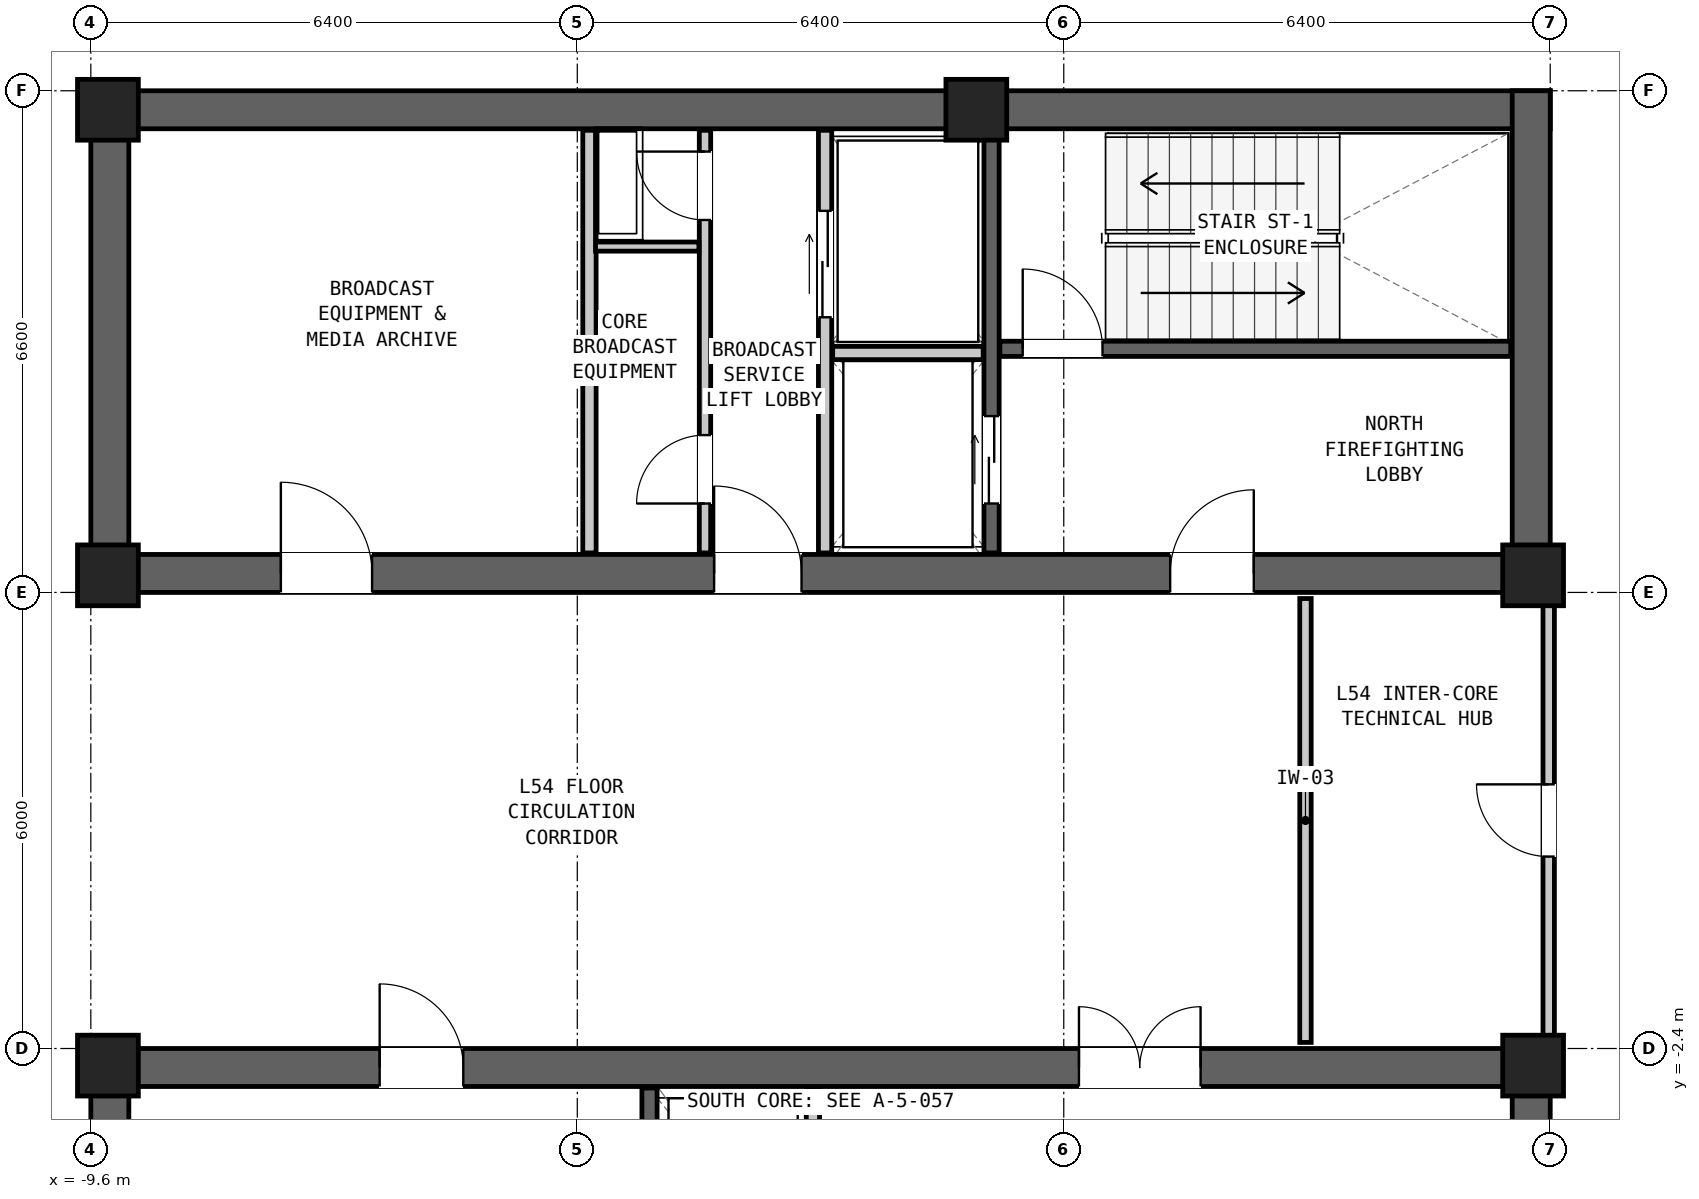
"""IFC4 building model, lengths in metres.
Left out: names, types, materials, properties, quantities, classifications, styles, units other than length and angle.
Written with IfcOpenShell. Run it as: python <this file> out.ifc"""

import sys

from ifc_helpers import new_model, si_unit, direction, frame, frame_2d, origin, origin_2d, place, context, subcontext, project, spatial, rectangle, extrude, element, fill, save


model = new_model("IFC4")
c1 = context("Model", 3, precision=1e-05, world=origin(), true_north=direction((0.0, 1.0)))
c2 = subcontext(c1, "Body", "Model", "MODEL_VIEW")
j1 = project(units=[si_unit("LENGTHUNIT", "METRE"), si_unit("PLANEANGLEUNIT", "RADIAN")], contexts=[c1])
p1 = place(None, origin())
s1 = spatial("IfcSite", under=j1, at=p1, CompositionType="ELEMENT")
p2 = place(p1, origin())
s2 = spatial("IfcBuilding", under=s1, at=p2, CompositionType="ELEMENT")
p3 = place(p2, frame((0.0, 0.0, 183.6)))
s3 = spatial("IfcBuildingStorey", under=s2, at=p3, CompositionType="ELEMENT", Elevation=183.6)
p4 = place(p3, frame((-9.6, 9.95, 0.0), z_axis=(0.0, 0.0, 1.0), x_axis=(1.0, 0.0, 0.0)))
e1 = element("IfcWall", 1, at=p4, inside=s3, PredefinedType="SHEAR", context=c2, shape_type="SweptSolid", body=[
    extrude(rectangle(XDim=19.2, YDim=0.5, at=frame_2d((9.6, 0.0))), origin(), (0.0, 0.0, 1.0), 4.35),
])
p5 = place(p3, frame((-9.6, 3.85, 0.0), z_axis=(0.0, 0.0, 1.0), x_axis=(1.0, 0.0, 0.0)))
e2 = element("IfcWall", 2, at=p5, inside=s3, PredefinedType="SHEAR", context=c2, shape_type="SweptSolid", body=[
    extrude(rectangle(XDim=19.2, YDim=0.5, at=frame_2d((9.6, 0.0))), origin(), (0.0, 0.0, 1.0), 4.35),
])
p6 = place(p5, frame((14.2, 0.0, 0.0)))
e3 = element("IfcOpeningElement", 3, at=p6, cuts=e2, PredefinedType="OPENING", context=c2, shape_type="SweptSolid", body=[
    extrude(rectangle(XDim=1.1, YDim=2.08, at=frame_2d((0.55, 1.04))), frame((0.0, 0.262, 0.0), z_axis=(0.0, -1.0, 0.0), x_axis=(1.0, 0.0, 0.0)), (0.0, 0.0, 1.0), 0.524),
])
p7 = place(p5, frame((8.2, 0.0, 0.0)))
e4 = element("IfcOpeningElement", 4, at=p7, cuts=e2, PredefinedType="OPENING", context=c2, shape_type="SweptSolid", body=[
    extrude(rectangle(XDim=1.15, YDim=2.1, at=frame_2d((0.575, 1.05))), frame((0.0, 0.262, 0.0), z_axis=(0.0, -1.0, 0.0), x_axis=(1.0, 0.0, 0.0)), (0.0, 0.0, 1.0), 0.524),
])
p8 = place(p5, frame((2.5, 0.0, 0.0)))
e5 = element("IfcOpeningElement", 5, at=p8, cuts=e2, PredefinedType="OPENING", context=c2, shape_type="SweptSolid", body=[
    extrude(rectangle(XDim=1.2, YDim=2.1, at=frame_2d((0.6, 1.05))), frame((0.0, 0.262, 0.0), z_axis=(0.0, -1.0, 0.0), x_axis=(1.0, 0.0, 0.0)), (0.0, 0.0, 1.0), 0.524),
])
for number, where, z_axis, x_axis in (
    (6, (-9.35, 3.6, 0.0), (0.0, 0.0, 1.0), (0.0, 1.0, 0.0)),
    (7, (9.35, 3.6, 0.0), (0.0, 0.0, 1.0), (0.0, 1.0, 0.0)),
):
    element("IfcWall", number, at=place(p3, frame(where, z_axis=z_axis, x_axis=x_axis)), inside=s3, PredefinedType="SHEAR", context=c2, shape_type="SweptSolid", body=[
        extrude(rectangle(XDim=6.6, YDim=0.5, at=frame_2d((3.3, 0.0))), origin(), (0.0, 0.0, 1.0), 4.35),
    ])
p9 = place(p3, frame((-9.6, -2.65, 0.0), z_axis=(0.0, 0.0, 1.0), x_axis=(1.0, 0.0, 0.0)))
e8 = element("IfcWall", 8, at=p9, inside=s3, PredefinedType="SHEAR", context=c2, shape_type="SweptSolid", body=[
    extrude(rectangle(XDim=19.2, YDim=0.5, at=frame_2d((9.6, 0.0))), origin(), (0.0, 0.0, 1.0), 4.35),
])
p10 = place(p9, frame((3.8, 0.0, 0.0)))
e9 = element("IfcOpeningElement", 9, at=p10, cuts=e8, PredefinedType="OPENING", context=c2, shape_type="SweptSolid", body=[
    extrude(rectangle(XDim=1.1, YDim=2.08, at=frame_2d((0.55, 1.04))), frame((0.0, 0.262, 0.0), z_axis=(0.0, -1.0, 0.0), x_axis=(1.0, 0.0, 0.0)), (0.0, 0.0, 1.0), 0.524),
])
p11 = place(p9, frame((13.0, 0.0, 0.0)))
e10 = element("IfcOpeningElement", 10, at=p11, cuts=e8, PredefinedType="OPENING", context=c2, shape_type="SweptSolid", body=[
    extrude(rectangle(XDim=1.6, YDim=2.12, at=frame_2d((0.8, 1.06))), frame((0.0, 0.262, 0.0), z_axis=(0.0, -1.0, 0.0), x_axis=(1.0, 0.0, 0.0)), (0.0, 0.0, 1.0), 0.524),
])
for number, where, z_axis, x_axis in (
    (11, (-9.35, -9.0, 0.0), (0.0, 0.0, 1.0), (0.0, 1.0, 0.0)),
    (12, (9.35, -9.0, 0.0), (0.0, 0.0, 1.0), (0.0, 1.0, 0.0)),
):
    element("IfcWall", number, at=place(p3, frame(where, z_axis=z_axis, x_axis=x_axis)), inside=s3, PredefinedType="SHEAR", context=c2, shape_type="SweptSolid", body=[
        extrude(rectangle(XDim=6.6, YDim=0.5, at=frame_2d((3.3, 0.0))), origin(), (0.0, 0.0, 1.0), 4.35),
    ])
for number, where, z_axis, x_axis in (
    (13, (-9.375, 9.95, 0.0), (0.0, 0.0, 1.0), (1.0, 0.0, 0.0)),
    (14, (2.05, 9.95, 0.0), (0.0, 0.0, 1.0), (1.0, 0.0, 0.0)),
    (15, (-9.375, 3.825, 0.0), (0.0, 0.0, 1.0), (1.0, 0.0, 0.0)),
    (16, (9.375, 3.825, 0.0), (0.0, 0.0, 1.0), (1.0, 0.0, 0.0)),
    (17, (-9.375, -2.625, 0.0), (0.0, 0.0, 1.0), (1.0, 0.0, 0.0)),
    (18, (9.375, -2.625, 0.0), (0.0, 0.0, 1.0), (1.0, 0.0, 0.0)),
):
    element("IfcColumn", number, at=place(p3, frame(where, z_axis=z_axis, x_axis=x_axis)), inside=s3, PredefinedType="COLUMN", context=c2, shape_type="SweptSolid", body=[
        extrude(rectangle(XDim=0.8, YDim=0.8, at=origin_2d()), origin(), (0.0, 0.0, 1.0), 4.35),
    ])
p12 = place(p3, frame((2.36, 6.805, 0.0), z_axis=(0.0, 0.0, 1.0), x_axis=(1.0, 0.0, 0.0)))
e19 = element("IfcWall", 19, at=p12, inside=s3, PredefinedType="SHEAR", context=c2, shape_type="SweptSolid", body=[
    extrude(rectangle(XDim=6.72, YDim=0.2, at=frame_2d((3.36, 0.0))), origin(), (0.0, 0.0, 1.0), 4.07),
])
p13 = place(p12, frame((0.3, 0.0, 0.0)))
e20 = element("IfcOpeningElement", 20, at=p13, cuts=e19, PredefinedType="OPENING", context=c2, shape_type="SweptSolid", body=[
    extrude(rectangle(XDim=1.05, YDim=2.08, at=frame_2d((0.525, 1.04))), frame((0.0, 0.112, 0.0), z_axis=(0.0, -1.0, 0.0), x_axis=(1.0, 0.0, 0.0)), (0.0, 0.0, 1.0), 0.224),
])
p14 = place(p3, frame((2.25, 4.12, 0.0), z_axis=(0.0, 0.0, 1.0), x_axis=(0.0, 1.0, 0.0)))
e21 = element("IfcWall", 21, at=p14, inside=s3, PredefinedType="SHEAR", context=c2, shape_type="SweptSolid", body=[
    extrude(rectangle(XDim=5.56, YDim=0.2, at=frame_2d((2.78, 0.0))), origin(), (0.0, 0.0, 1.0), 4.07),
])
p15 = place(p14, frame((0.65, 0.0, 0.0)))
e22 = element("IfcOpeningElement", 22, at=p15, cuts=e21, PredefinedType="OPENING", context=c2, shape_type="SweptSolid", body=[
    extrude(rectangle(XDim=1.15, YDim=2.08, at=frame_2d((0.575, 1.04))), frame((0.0, 0.112, 0.0), z_axis=(0.0, -1.0, 0.0), x_axis=(1.0, 0.0, 0.0)), (0.0, 0.0, 1.0), 0.224),
])
p16 = place(p3, frame((0.06, 4.12, 0.0), z_axis=(0.0, 0.0, 1.0), x_axis=(0.0, 1.0, 0.0)))
e23 = element("IfcWall", 23, at=p16, inside=s3, PredefinedType="PARTITIONING", context=c2, shape_type="SweptSolid", body=[
    extrude(rectangle(XDim=5.56, YDim=0.175, at=frame_2d((2.78, 0.0))), origin(), (0.0, 0.0, 1.0), 4.07),
])
p17 = place(p16, frame((3.1, 0.0, 0.0)))
e24 = element("IfcOpeningElement", 24, at=p17, cuts=e23, PredefinedType="OPENING", context=c2, shape_type="SweptSolid", body=[
    extrude(rectangle(XDim=1.4, YDim=2.12, at=frame_2d((0.7, 1.06))), frame((0.0, 0.1, 0.0), z_axis=(0.0, -1.0, 0.0), x_axis=(1.0, 0.0, 0.0)), (0.0, 0.0, 1.0), 0.199),
])
p18 = place(p3, frame((0.16, 6.75, 0.0), z_axis=(0.0, 0.0, 1.0), x_axis=(1.0, 0.0, 0.0)))
e25 = element("IfcWall", 25, at=p18, inside=s3, PredefinedType="PARTITIONING", context=c2, shape_type="SweptSolid", body=[
    extrude(rectangle(XDim=1.98, YDim=0.175, at=frame_2d((0.99, 0.0))), origin(), (0.0, 0.0, 1.0), 4.07),
])
p19 = place(p3, frame((-3.04, 4.12, 0.0), z_axis=(0.0, 0.0, 1.0), x_axis=(0.0, 1.0, 0.0)))
e26 = element("IfcWall", 26, at=p19, inside=s3, PredefinedType="PARTITIONING", context=c2, shape_type="SweptSolid", body=[
    extrude(rectangle(XDim=5.56, YDim=0.175, at=frame_2d((2.78, 0.0))), origin(), (0.0, 0.0, 1.0), 4.07),
])
p20 = place(p3, frame((-1.52, 4.12, 0.0), z_axis=(0.0, 0.0, 1.0), x_axis=(0.0, 1.0, 0.0)))
e27 = element("IfcWall", 27, at=p20, inside=s3, PredefinedType="PARTITIONING", context=c2, shape_type="SweptSolid", body=[
    extrude(rectangle(XDim=5.56, YDim=0.15, at=frame_2d((2.78, 0.0))), origin(), (0.0, 0.0, 1.0), 4.07),
])
p21 = place(p20, frame((4.38, 0.0, 0.0)))
e28 = element("IfcOpeningElement", 28, at=p21, cuts=e27, PredefinedType="OPENING", context=c2, shape_type="SweptSolid", body=[
    extrude(rectangle(XDim=0.9, YDim=2.05, at=frame_2d((0.45, 1.025))), frame((0.0, 0.087, 0.0), z_axis=(0.0, -1.0, 0.0), x_axis=(1.0, 0.0, 0.0)), (0.0, 0.0, 1.0), 0.174),
])
p22 = place(p20, frame((0.65, 0.0, 0.0)))
e29 = element("IfcOpeningElement", 29, at=p22, cuts=e27, PredefinedType="OPENING", context=c2, shape_type="SweptSolid", body=[
    extrude(rectangle(XDim=0.9, YDim=2.05, at=frame_2d((0.45, 1.025))), frame((0.0, 0.087, 0.0), z_axis=(0.0, -1.0, 0.0), x_axis=(1.0, 0.0, 0.0)), (0.0, 0.0, 1.0), 0.174),
])
p23 = place(p3, frame((-2.96, 8.15, 0.0), z_axis=(0.0, 0.0, 1.0), x_axis=(1.0, 0.0, 0.0)))
e30 = element("IfcWall", 30, at=p23, inside=s3, PredefinedType="PARTITIONING", context=c2, shape_type="SweptSolid", body=[
    extrude(rectangle(XDim=1.36, YDim=0.12, at=frame_2d((0.68, 0.0))), origin(), (0.0, 0.0, 1.0), 4.07),
])
p24 = place(p3, frame((-2.25, -8.48, 0.0), z_axis=(0.0, 0.0, 1.0), x_axis=(0.0, 1.0, 0.0)))
e31 = element("IfcWall", 31, at=p24, inside=s3, PredefinedType="SHEAR", context=c2, shape_type="SweptSolid", body=[
    extrude(rectangle(XDim=5.56, YDim=0.2, at=frame_2d((2.78, 0.0))), origin(), (0.0, 0.0, 1.0), 4.07),
])
p25 = place(p24, frame((3.35, 0.0, 0.0)))
e32 = element("IfcOpeningElement", 32, at=p25, cuts=e31, PredefinedType="OPENING", context=c2, shape_type="SweptSolid", body=[
    extrude(rectangle(XDim=1.15, YDim=2.08, at=frame_2d((0.575, 1.04))), frame((0.0, 0.112, 0.0), z_axis=(0.0, -1.0, 0.0), x_axis=(1.0, 0.0, 0.0)), (0.0, 0.0, 1.0), 0.224),
])
p26 = place(p3, frame((-0.1, -8.48, 0.0), z_axis=(0.0, 0.0, 1.0), x_axis=(0.0, 1.0, 0.0)))
e33 = element("IfcWall", 33, at=p26, inside=s3, PredefinedType="PARTITIONING", context=c2, shape_type="SweptSolid", body=[
    extrude(rectangle(XDim=5.56, YDim=0.175, at=frame_2d((2.78, 0.0))), origin(), (0.0, 0.0, 1.0), 4.07),
])
p27 = place(p26, frame((0.45, 0.0, 0.0)))
e34 = element("IfcOpeningElement", 34, at=p27, cuts=e33, PredefinedType="OPENING", context=c2, shape_type="SweptSolid", body=[
    extrude(rectangle(XDim=0.9, YDim=2.05, at=frame_2d((0.45, 1.025))), frame((0.0, 0.1, 0.0), z_axis=(0.0, -1.0, 0.0), x_axis=(1.0, 0.0, 0.0)), (0.0, 0.0, 1.0), 0.199),
])
p28 = place(p3, frame((6.38, -2.32, 0.0), z_axis=(0.0, 0.0, 1.0), x_axis=(0.0, 1.0, 0.0)))
e35 = element("IfcWall", 35, at=p28, inside=s3, PredefinedType="PARTITIONING", context=c2, shape_type="SweptSolid", body=[
    extrude(rectangle(XDim=5.84, YDim=0.15, at=frame_2d((2.92, 0.0))), origin(), (0.0, 0.0, 1.0), 3.438),
])
p29 = place(p3, frame((9.58, -2.32, 0.0), z_axis=(0.0, 0.0, 1.0), x_axis=(0.0, 1.0, 0.0)))
e36 = element("IfcWall", 36, at=p29, inside=s3, PredefinedType="PARTITIONING", context=c2, shape_type="SweptSolid", body=[
    extrude(rectangle(XDim=5.84, YDim=0.15, at=frame_2d((2.92, 0.0))), origin(), (0.0, 0.0, 1.0), 2.25),
])
p30 = place(p29, frame((2.445, 0.0, 0.0)))
e37 = element("IfcOpeningElement", 37, at=p30, cuts=e36, PredefinedType="OPENING", context=c2, shape_type="SweptSolid", body=[
    extrude(rectangle(XDim=0.95, YDim=2.1, at=frame_2d((0.475, 1.05))), frame((0.0, 0.087, 0.0), z_axis=(0.0, -1.0, 0.0), x_axis=(1.0, 0.0, 0.0)), (0.0, 0.0, 1.0), 0.174),
])
p31 = place(p13, origin())
e38 = element("IfcDoor", 38, at=p31, inside=s3, OperationType="SINGLE_SWING_LEFT", PredefinedType="DOOR", context=c2, shape_type="SweptSolid", body=[
    extrude(rectangle(XDim=1.05, YDim=2.08, at=frame_2d((0.525, 1.04))), frame((0.0, 0.025, 0.0), z_axis=(0.0, -1.0, 0.0), x_axis=(1.0, 0.0, 0.0)), (0.0, 0.0, 1.0), 0.05),
])
fill(e20, e38)
p32 = place(p6, origin())
e39 = element("IfcDoor", 39, at=p32, inside=s3, OperationType="SINGLE_SWING_RIGHT", PredefinedType="DOOR", context=c2, shape_type="SweptSolid", body=[
    extrude(rectangle(XDim=1.1, YDim=2.08, at=frame_2d((0.55, 1.04))), frame((0.0, 0.025, 0.0), z_axis=(0.0, -1.0, 0.0), x_axis=(1.0, 0.0, 0.0)), (0.0, 0.0, 1.0), 0.05),
])
fill(e3, e39)
p33 = place(p15, origin())
e40 = element("IfcDoor", 40, at=p33, inside=s3, OperationType="DOUBLE_DOOR_SLIDING", PredefinedType="DOOR", context=c2, shape_type="SweptSolid", body=[
    extrude(rectangle(XDim=1.15, YDim=2.08, at=frame_2d((0.575, 1.04))), frame((0.0, 0.025, 0.0), z_axis=(0.0, -1.0, 0.0), x_axis=(1.0, 0.0, 0.0)), (0.0, 0.0, 1.0), 0.05),
])
fill(e22, e40)
p34 = place(p17, origin())
e41 = element("IfcDoor", 41, at=p34, inside=s3, OperationType="DOUBLE_DOOR_SLIDING", PredefinedType="DOOR", context=c2, shape_type="SweptSolid", body=[
    extrude(rectangle(XDim=1.4, YDim=2.12, at=frame_2d((0.7, 1.06))), frame((0.0, 0.025, 0.0), z_axis=(0.0, -1.0, 0.0), x_axis=(1.0, 0.0, 0.0)), (0.0, 0.0, 1.0), 0.05),
])
fill(e24, e41)
p35 = place(p7, origin())
e42 = element("IfcDoor", 42, at=p35, inside=s3, OperationType="SINGLE_SWING_LEFT", PredefinedType="DOOR", context=c2, shape_type="SweptSolid", body=[
    extrude(rectangle(XDim=1.15, YDim=2.1, at=frame_2d((0.575, 1.05))), frame((0.0, 0.025, 0.0), z_axis=(0.0, -1.0, 0.0), x_axis=(1.0, 0.0, 0.0)), (0.0, 0.0, 1.0), 0.05),
])
fill(e4, e42)
p36 = place(p21, origin())
e43 = element("IfcDoor", 43, at=p36, inside=s3, OperationType="SINGLE_SWING_RIGHT", PredefinedType="DOOR", context=c2, shape_type="SweptSolid", body=[
    extrude(rectangle(XDim=0.9, YDim=2.05, at=frame_2d((0.45, 1.025))), frame((0.0, 0.025, 0.0), z_axis=(0.0, -1.0, 0.0), x_axis=(1.0, 0.0, 0.0)), (0.0, 0.0, 1.0), 0.05),
])
fill(e28, e43)
p37 = place(p22, origin())
e44 = element("IfcDoor", 44, at=p37, inside=s3, OperationType="SINGLE_SWING_LEFT", PredefinedType="DOOR", context=c2, shape_type="SweptSolid", body=[
    extrude(rectangle(XDim=0.9, YDim=2.05, at=frame_2d((0.45, 1.025))), frame((0.0, 0.025, 0.0), z_axis=(0.0, -1.0, 0.0), x_axis=(1.0, 0.0, 0.0)), (0.0, 0.0, 1.0), 0.05),
])
fill(e29, e44)
p38 = place(p8, origin())
e45 = element("IfcDoor", 45, at=p38, inside=s3, OperationType="SINGLE_SWING_LEFT", PredefinedType="DOOR", context=c2, shape_type="SweptSolid", body=[
    extrude(rectangle(XDim=1.2, YDim=2.1, at=frame_2d((0.6, 1.05))), frame((0.0, 0.025, 0.0), z_axis=(0.0, -1.0, 0.0), x_axis=(1.0, 0.0, 0.0)), (0.0, 0.0, 1.0), 0.05),
])
fill(e5, e45)
p39 = place(p10, origin())
e46 = element("IfcDoor", 46, at=p39, inside=s3, OperationType="SINGLE_SWING_LEFT", PredefinedType="DOOR", context=c2, shape_type="SweptSolid", body=[
    extrude(rectangle(XDim=1.1, YDim=2.08, at=frame_2d((0.55, 1.04))), frame((0.0, 0.025, 0.0), z_axis=(0.0, -1.0, 0.0), x_axis=(1.0, 0.0, 0.0)), (0.0, 0.0, 1.0), 0.05),
])
fill(e9, e46)
p40 = place(p11, origin())
e47 = element("IfcDoor", 47, at=p40, inside=s3, OperationType="DOUBLE_DOOR_SINGLE_SWING", PredefinedType="DOOR", context=c2, shape_type="SweptSolid", body=[
    extrude(rectangle(XDim=1.6, YDim=2.12, at=frame_2d((0.8, 1.06))), frame((0.0, 0.025, 0.0), z_axis=(0.0, -1.0, 0.0), x_axis=(1.0, 0.0, 0.0)), (0.0, 0.0, 1.0), 0.05),
])
fill(e10, e47)
p41 = place(p30, origin())
e48 = element("IfcDoor", 48, at=p41, inside=s3, OperationType="SINGLE_SWING_RIGHT", PredefinedType="DOOR", context=c2, shape_type="SweptSolid", body=[
    extrude(rectangle(XDim=0.95, YDim=2.1, at=frame_2d((0.475, 1.05))), frame((0.0, 0.025, 0.0), z_axis=(0.0, -1.0, 0.0), x_axis=(1.0, 0.0, 0.0)), (0.0, 0.0, 1.0), 0.05),
])
fill(e37, e48)
save(model, sys.argv[1])
